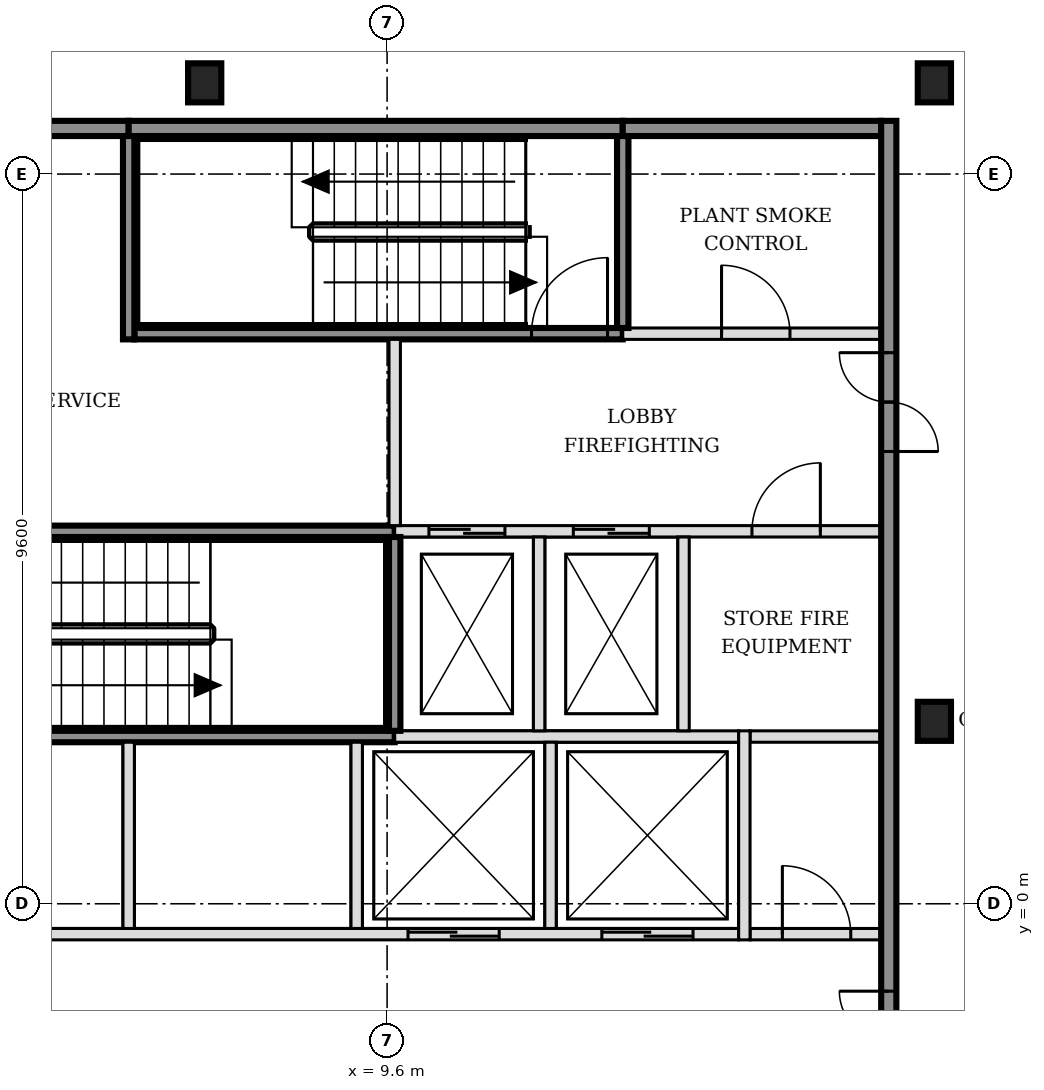
"""IFC4 building model, lengths in metres.
Left out: names, types, materials, properties, quantities, classifications, styles, units other than length and angle.
Written with IfcOpenShell. Run it as: python <this file> out.ifc"""

import sys

from ifc_helpers import new_model, si_unit, direction, frame, frame_2d, origin, origin_2d, place, context, subcontext, project, spatial, rectangle, i_section, extrude, element, fill, save


model = new_model("IFC4")
c1 = context("Model", 3, precision=1e-05, world=origin(), true_north=direction((0.0, 1.0)))
c2 = subcontext(c1, "Body", "Model", "MODEL_VIEW")
j1 = project(units=[si_unit("LENGTHUNIT", "METRE"), si_unit("PLANEANGLEUNIT", "RADIAN")], contexts=[c1])
p1 = place(None, origin())
s1 = spatial("IfcSite", under=j1, at=p1, CompositionType="ELEMENT")
p2 = place(p1, origin())
s2 = spatial("IfcBuilding", under=s1, at=p2, CompositionType="ELEMENT")
p3 = place(p2, frame((0.0, 0.0, 79.8)))
s3 = spatial("IfcBuildingStorey", under=s2, at=p3, CompositionType="ELEMENT", Elevation=79.8)
for number, where, z_axis, x_axis in (
    (1, (16.8, 2.4, -0.15), (0.0, 0.0, 1.0), (1.0, 0.0, 0.0)),
    (2, (7.2, 10.8, -0.15), (0.0, 0.0, 1.0), (1.0, 0.0, 0.0)),
    (3, (16.8, 10.8, -0.15), (0.0, 0.0, 1.0), (1.0, 0.0, 0.0)),
):
    element("IfcColumn", number, at=place(p3, frame(where, z_axis=z_axis, x_axis=x_axis)), inside=s3, PredefinedType="COLUMN", context=c2, shape_type="SweptSolid", body=[
        extrude(i_section(OverallWidth=0.437, OverallDepth=0.514, WebThickness=0.061, FlangeThickness=0.097, FilletRadius=0.015, at=origin_2d()), origin(), (0.0, 0.0, 1.0), 3.6),
    ])
p4 = place(p3, frame((-1.7, -0.4, 0.0), z_axis=(0.0, 0.0, 1.0), x_axis=(1.0, 0.0, 0.0)))
e4 = element("IfcWall", 4, at=p4, inside=s3, PredefinedType="SOLIDWALL", context=c2, shape_type="SweptSolid", body=[
    extrude(rectangle(XDim=15.925, YDim=0.15, at=frame_2d((7.962, 0.0))), origin(), (0.0, 0.0, 1.0), 3.45),
])
p5 = place(p4, frame((0.6, 0.0, 0.0)))
e5 = element("IfcOpeningElement", 5, at=p5, cuts=e4, PredefinedType="OPENING", context=c2, shape_type="SweptSolid", body=[
    extrude(rectangle(XDim=1.1, YDim=2.1, at=frame_2d((0.55, 1.05))), frame((0.0, 0.085, 0.0), z_axis=(0.0, -1.0, 0.0), x_axis=(1.0, 0.0, 0.0)), (0.0, 0.0, 1.0), 0.17),
])
p6 = place(p4, frame((3.1, 0.0, 0.0)))
e6 = element("IfcOpeningElement", 6, at=p6, cuts=e4, PredefinedType="OPENING", context=c2, shape_type="SweptSolid", body=[
    extrude(rectangle(XDim=1.1, YDim=2.1, at=frame_2d((0.55, 1.05))), frame((0.0, 0.085, 0.0), z_axis=(0.0, -1.0, 0.0), x_axis=(1.0, 0.0, 0.0)), (0.0, 0.0, 1.0), 0.17),
])
p7 = place(p4, frame((11.575, 0.0, 0.0)))
e7 = element("IfcOpeningElement", 7, at=p7, cuts=e4, PredefinedType="OPENING", context=c2, shape_type="SweptSolid", body=[
    extrude(rectangle(XDim=1.2, YDim=2.1, at=frame_2d((0.6, 1.05))), frame((0.0, 0.085, 0.0), z_axis=(0.0, -1.0, 0.0), x_axis=(1.0, 0.0, 0.0)), (0.0, 0.0, 1.0), 0.17),
])
p8 = place(p4, frame((14.125, 0.0, 0.0)))
e8 = element("IfcOpeningElement", 8, at=p8, cuts=e4, PredefinedType="OPENING", context=c2, shape_type="SweptSolid", body=[
    extrude(rectangle(XDim=1.2, YDim=2.1, at=frame_2d((0.6, 1.05))), frame((0.0, 0.085, 0.0), z_axis=(0.0, -1.0, 0.0), x_axis=(1.0, 0.0, 0.0)), (0.0, 0.0, 1.0), 0.17),
])
p9 = place(p3, frame((14.375, -0.4, 0.0), z_axis=(0.0, 0.0, 1.0), x_axis=(1.0, 0.0, 0.0)))
e9 = element("IfcWall", 9, at=p9, inside=s3, PredefinedType="PARTITIONING", context=c2, shape_type="SweptSolid", body=[
    extrude(rectangle(XDim=1.725, YDim=0.15, at=frame_2d((0.863, 0.0))), origin(), (0.0, 0.0, 1.0), 3.45),
])
p10 = place(p9, frame((0.425, 0.0, 0.0)))
e10 = element("IfcOpeningElement", 10, at=p10, cuts=e9, PredefinedType="OPENING", context=c2, shape_type="SweptSolid", body=[
    extrude(rectangle(XDim=0.9, YDim=2.1, at=frame_2d((0.45, 1.05))), frame((0.0, 0.085, 0.0), z_axis=(0.0, -1.0, 0.0), x_axis=(1.0, 0.0, 0.0)), (0.0, 0.0, 1.0), 0.17),
])
p11 = place(p3, frame((3.2, 2.2, 0.0), z_axis=(0.0, 0.0, 1.0), x_axis=(1.0, 0.0, 0.0)))
e11 = element("IfcWall", 11, at=p11, inside=s3, PredefinedType="SOLIDWALL", context=c2, shape_type="SweptSolid", body=[
    extrude(rectangle(XDim=6.5, YDim=0.15, at=frame_2d((3.25, 0.0))), origin(), (0.0, 0.0, 1.0), 3.45),
])
p12 = place(p3, frame((9.7, 2.2, 0.0), z_axis=(0.0, 0.0, 1.0), x_axis=(1.0, 0.0, 0.0)))
e12 = element("IfcWall", 12, at=p12, inside=s3, PredefinedType="SOLIDWALL", context=c2, shape_type="SweptSolid", body=[
    extrude(rectangle(XDim=4.525, YDim=0.15, at=frame_2d((2.263, 0.0))), origin(), (0.0, 0.0, 1.0), 3.45),
])
p13 = place(p3, frame((14.375, 2.2, 0.0), z_axis=(0.0, 0.0, 1.0), x_axis=(1.0, 0.0, 0.0)))
e13 = element("IfcWall", 13, at=p13, inside=s3, PredefinedType="PARTITIONING", context=c2, shape_type="SweptSolid", body=[
    extrude(rectangle(XDim=1.725, YDim=0.15, at=frame_2d((0.863, 0.0))), origin(), (0.0, 0.0, 1.0), 3.45),
])
p14 = place(p3, frame((3.275, 4.9, 0.0), z_axis=(0.0, 0.0, 1.0), x_axis=(1.0, 0.0, 0.0)))
e14 = element("IfcWall", 14, at=p14, inside=s3, PredefinedType="SOLIDWALL", context=c2, shape_type="SweptSolid", body=[
    extrude(rectangle(XDim=6.425, YDim=0.15, at=frame_2d((3.212, 0.0))), origin(), (0.0, 0.0, 1.0), 3.45),
])
p15 = place(p14, frame((0.1, 0.0, 0.0)))
e15 = element("IfcOpeningElement", 15, at=p15, cuts=e14, PredefinedType="OPENING", context=c2, shape_type="SweptSolid", body=[
    extrude(rectangle(XDim=1.0, YDim=2.1, at=frame_2d((0.5, 1.05))), frame((0.0, 0.085, 0.0), z_axis=(0.0, -1.0, 0.0), x_axis=(1.0, 0.0, 0.0)), (0.0, 0.0, 1.0), 0.17),
])
p16 = place(p3, frame((9.7, 4.9, 0.0), z_axis=(0.0, 0.0, 1.0), x_axis=(1.0, 0.0, 0.0)))
e16 = element("IfcWall", 16, at=p16, inside=s3, PredefinedType="SOLIDWALL", context=c2, shape_type="SweptSolid", body=[
    extrude(rectangle(XDim=6.4, YDim=0.15, at=frame_2d((3.2, 0.0))), origin(), (0.0, 0.0, 1.0), 3.45),
])
p17 = place(p16, frame((0.45, 0.0, 0.0)))
e17 = element("IfcOpeningElement", 17, at=p17, cuts=e16, PredefinedType="OPENING", context=c2, shape_type="SweptSolid", body=[
    extrude(rectangle(XDim=1.0, YDim=2.1, at=frame_2d((0.5, 1.05))), frame((0.0, 0.085, 0.0), z_axis=(0.0, -1.0, 0.0), x_axis=(1.0, 0.0, 0.0)), (0.0, 0.0, 1.0), 0.17),
])
p18 = place(p16, frame((2.35, 0.0, 0.0)))
e18 = element("IfcOpeningElement", 18, at=p18, cuts=e16, PredefinedType="OPENING", context=c2, shape_type="SweptSolid", body=[
    extrude(rectangle(XDim=1.0, YDim=2.1, at=frame_2d((0.5, 1.05))), frame((0.0, 0.085, 0.0), z_axis=(0.0, -1.0, 0.0), x_axis=(1.0, 0.0, 0.0)), (0.0, 0.0, 1.0), 0.17),
])
p19 = place(p16, frame((4.7, 0.0, 0.0)))
e19 = element("IfcOpeningElement", 19, at=p19, cuts=e16, PredefinedType="OPENING", context=c2, shape_type="SweptSolid", body=[
    extrude(rectangle(XDim=0.9, YDim=2.1, at=frame_2d((0.45, 1.05))), frame((0.0, 0.085, 0.0), z_axis=(0.0, -1.0, 0.0), x_axis=(1.0, 0.0, 0.0)), (0.0, 0.0, 1.0), 0.17),
])
p20 = place(p3, frame((6.275, 7.5, 0.0), z_axis=(0.0, 0.0, 1.0), x_axis=(1.0, 0.0, 0.0)))
e20 = element("IfcWall", 20, at=p20, inside=s3, PredefinedType="SOLIDWALL", context=c2, shape_type="SweptSolid", body=[
    extrude(rectangle(XDim=6.425, YDim=0.15, at=frame_2d((3.212, 0.0))), origin(), (0.0, 0.0, 1.0), 3.45),
])
p21 = place(p20, frame((5.225, 0.0, 0.0)))
e21 = element("IfcOpeningElement", 21, at=p21, cuts=e20, PredefinedType="OPENING", context=c2, shape_type="SweptSolid", body=[
    extrude(rectangle(XDim=1.0, YDim=2.1, at=frame_2d((0.5, 1.05))), frame((0.0, 0.085, 0.0), z_axis=(0.0, -1.0, 0.0), x_axis=(1.0, 0.0, 0.0)), (0.0, 0.0, 1.0), 0.17),
])
p22 = place(p3, frame((12.7, 7.5, 0.0), z_axis=(0.0, 0.0, 1.0), x_axis=(1.0, 0.0, 0.0)))
e22 = element("IfcWall", 22, at=p22, inside=s3, PredefinedType="SOLIDWALL", context=c2, shape_type="SweptSolid", body=[
    extrude(rectangle(XDim=3.4, YDim=0.15, at=frame_2d((1.7, 0.0))), origin(), (0.0, 0.0, 1.0), 3.45),
])
p23 = place(p22, frame((1.3, 0.0, 0.0)))
e23 = element("IfcOpeningElement", 23, at=p23, cuts=e22, PredefinedType="OPENING", context=c2, shape_type="SweptSolid", body=[
    extrude(rectangle(XDim=0.9, YDim=2.1, at=frame_2d((0.45, 1.05))), frame((0.0, 0.085, 0.0), z_axis=(0.0, -1.0, 0.0), x_axis=(1.0, 0.0, 0.0)), (0.0, 0.0, 1.0), 0.17),
])
p24 = place(p3, frame((-1.7, 10.2, 0.0), z_axis=(0.0, 0.0, 1.0), x_axis=(1.0, 0.0, 0.0)))
e24 = element("IfcWall", 24, at=p24, inside=s3, PredefinedType="SOLIDWALL", context=c2, shape_type="SweptSolid", body=[
    extrude(rectangle(XDim=7.9, YDim=0.2, at=frame_2d((3.95, 0.0))), origin(), (0.0, 0.0, 1.0), 3.45),
])
p25 = place(p3, frame((6.2, 10.2, 0.0), z_axis=(0.0, 0.0, 1.0), x_axis=(1.0, 0.0, 0.0)))
e25 = element("IfcWall", 25, at=p25, inside=s3, PredefinedType="SOLIDWALL", context=c2, shape_type="SweptSolid", body=[
    extrude(rectangle(XDim=6.5, YDim=0.2, at=frame_2d((3.25, 0.0))), origin(), (0.0, 0.0, 1.0), 3.45),
])
p26 = place(p3, frame((12.7, 10.2, 0.0), z_axis=(0.0, 0.0, 1.0), x_axis=(1.0, 0.0, 0.0)))
e26 = element("IfcWall", 26, at=p26, inside=s3, PredefinedType="SOLIDWALL", context=c2, shape_type="SweptSolid", body=[
    extrude(rectangle(XDim=3.4, YDim=0.2, at=frame_2d((1.7, 0.0))), origin(), (0.0, 0.0, 1.0), 3.45),
])
p27 = place(p3, frame((6.2, -0.325, 0.0), z_axis=(0.0, 0.0, 1.0), x_axis=(0.0, 1.0, 0.0)))
e27 = element("IfcWall", 27, at=p27, inside=s3, PredefinedType="SOLIDWALL", context=c2, shape_type="SweptSolid", body=[
    extrude(rectangle(XDim=2.45, YDim=0.15, at=frame_2d((1.225, 0.0))), origin(), (0.0, 0.0, 1.0), 3.45),
])
p28 = place(p3, frame((6.2, 7.425, 0.0), z_axis=(0.0, 0.0, 1.0), x_axis=(0.0, 1.0, 0.0)))
e28 = element("IfcWall", 28, at=p28, inside=s3, PredefinedType="SOLIDWALL", context=c2, shape_type="SweptSolid", body=[
    extrude(rectangle(XDim=2.675, YDim=0.15, at=frame_2d((1.337, 0.0))), origin(), (0.0, 0.0, 1.0), 3.45),
])
p29 = place(p3, frame((9.2, -0.325, 0.0), z_axis=(0.0, 0.0, 1.0), x_axis=(0.0, 1.0, 0.0)))
e29 = element("IfcWall", 29, at=p29, inside=s3, PredefinedType="SOLIDWALL", context=c2, shape_type="SweptSolid", body=[
    extrude(rectangle(XDim=2.45, YDim=0.15, at=frame_2d((1.225, 0.0))), origin(), (0.0, 0.0, 1.0), 3.45),
])
p30 = place(p3, frame((9.7, 2.275, 0.0), z_axis=(0.0, 0.0, 1.0), x_axis=(0.0, 1.0, 0.0)))
e30 = element("IfcWall", 30, at=p30, inside=s3, PredefinedType="SOLIDWALL", context=c2, shape_type="SweptSolid", body=[
    extrude(rectangle(XDim=2.55, YDim=0.15, at=frame_2d((1.275, 0.0))), origin(), (0.0, 0.0, 1.0), 3.45),
])
p31 = place(p3, frame((9.7, 4.975, 0.0), z_axis=(0.0, 0.0, 1.0), x_axis=(0.0, 1.0, 0.0)))
e31 = element("IfcWall", 31, at=p31, inside=s3, PredefinedType="SOLIDWALL", context=c2, shape_type="SweptSolid", body=[
    extrude(rectangle(XDim=2.45, YDim=0.15, at=frame_2d((1.225, 0.0))), origin(), (0.0, 0.0, 1.0), 3.45),
])
p32 = place(p3, frame((11.6, 2.275, 0.0), z_axis=(0.0, 0.0, 1.0), x_axis=(0.0, 1.0, 0.0)))
e32 = element("IfcWall", 32, at=p32, inside=s3, PredefinedType="SOLIDWALL", context=c2, shape_type="SweptSolid", body=[
    extrude(rectangle(XDim=2.55, YDim=0.15, at=frame_2d((1.275, 0.0))), origin(), (0.0, 0.0, 1.0), 3.45),
])
p33 = place(p3, frame((11.75, -0.325, 0.0), z_axis=(0.0, 0.0, 1.0), x_axis=(0.0, 1.0, 0.0)))
e33 = element("IfcWall", 33, at=p33, inside=s3, PredefinedType="SOLIDWALL", context=c2, shape_type="SweptSolid", body=[
    extrude(rectangle(XDim=2.45, YDim=0.15, at=frame_2d((1.225, 0.0))), origin(), (0.0, 0.0, 1.0), 3.45),
])
p34 = place(p3, frame((12.7, 7.575, 0.0), z_axis=(0.0, 0.0, 1.0), x_axis=(0.0, 1.0, 0.0)))
e34 = element("IfcWall", 34, at=p34, inside=s3, PredefinedType="SOLIDWALL", context=c2, shape_type="SweptSolid", body=[
    extrude(rectangle(XDim=2.525, YDim=0.15, at=frame_2d((1.263, 0.0))), origin(), (0.0, 0.0, 1.0), 3.45),
])
p35 = place(p3, frame((13.5, 2.275, 0.0), z_axis=(0.0, 0.0, 1.0), x_axis=(0.0, 1.0, 0.0)))
e35 = element("IfcWall", 35, at=p35, inside=s3, PredefinedType="SOLIDWALL", context=c2, shape_type="SweptSolid", body=[
    extrude(rectangle(XDim=2.55, YDim=0.15, at=frame_2d((1.275, 0.0))), origin(), (0.0, 0.0, 1.0), 3.45),
])
p36 = place(p3, frame((14.3, -0.475, 0.0), z_axis=(0.0, 0.0, 1.0), x_axis=(0.0, 1.0, 0.0)))
e36 = element("IfcWall", 36, at=p36, inside=s3, PredefinedType="SOLIDWALL", context=c2, shape_type="SweptSolid", body=[
    extrude(rectangle(XDim=2.75, YDim=0.15, at=frame_2d((1.375, 0.0))), origin(), (0.0, 0.0, 1.0), 3.45),
])
p37 = place(p3, frame((16.2, -5.5, 0.0), z_axis=(0.0, 0.0, 1.0), x_axis=(0.0, 1.0, 0.0)))
e37 = element("IfcWall", 37, at=p37, inside=s3, PredefinedType="SOLIDWALL", context=c2, shape_type="SweptSolid", body=[
    extrude(rectangle(XDim=15.8, YDim=0.2, at=frame_2d((7.9, 0.0))), origin(), (0.0, 0.0, 1.0), 3.45),
])
p38 = place(p37, frame((3.05, 0.0, 0.0)))
e38 = element("IfcOpeningElement", 38, at=p38, cuts=e37, PredefinedType="OPENING", context=c2, shape_type="SweptSolid", body=[
    extrude(rectangle(XDim=1.3, YDim=2.1, at=frame_2d((0.65, 1.05))), frame((0.0, 0.11, 0.0), z_axis=(0.0, -1.0, 0.0), x_axis=(1.0, 0.0, 0.0)), (0.0, 0.0, 1.0), 0.22),
])
p39 = place(p37, frame((11.45, 0.0, 0.0)))
e39 = element("IfcOpeningElement", 39, at=p39, cuts=e37, PredefinedType="OPENING", context=c2, shape_type="SweptSolid", body=[
    extrude(rectangle(XDim=1.3, YDim=2.1, at=frame_2d((0.65, 1.05))), frame((0.0, 0.11, 0.0), z_axis=(0.0, -1.0, 0.0), x_axis=(1.0, 0.0, 0.0)), (0.0, 0.0, 1.0), 0.22),
])
p40 = place(p7, origin())
e40 = element("IfcDoor", 40, at=p40, inside=s3, OperationType="DOUBLE_DOOR_SLIDING", PredefinedType="DOOR", context=c2, shape_type="SweptSolid", body=[
    extrude(rectangle(XDim=1.2, YDim=2.1, at=frame_2d((0.6, 1.05))), frame((0.0, 0.025, 0.0), z_axis=(0.0, -1.0, 0.0), x_axis=(1.0, 0.0, 0.0)), (0.0, 0.0, 1.0), 0.05),
])
fill(e7, e40)
p41 = place(p8, origin())
e41 = element("IfcDoor", 41, at=p41, inside=s3, OperationType="DOUBLE_DOOR_SLIDING", PredefinedType="DOOR", context=c2, shape_type="SweptSolid", body=[
    extrude(rectangle(XDim=1.2, YDim=2.1, at=frame_2d((0.6, 1.05))), frame((0.0, 0.025, 0.0), z_axis=(0.0, -1.0, 0.0), x_axis=(1.0, 0.0, 0.0)), (0.0, 0.0, 1.0), 0.05),
])
fill(e8, e41)
p42 = place(p17, origin())
e42 = element("IfcDoor", 42, at=p42, inside=s3, OperationType="DOUBLE_DOOR_SLIDING", PredefinedType="DOOR", context=c2, shape_type="SweptSolid", body=[
    extrude(rectangle(XDim=1.0, YDim=2.1, at=frame_2d((0.5, 1.05))), frame((0.0, 0.025, 0.0), z_axis=(0.0, -1.0, 0.0), x_axis=(1.0, 0.0, 0.0)), (0.0, 0.0, 1.0), 0.05),
])
fill(e17, e42)
p43 = place(p18, origin())
e43 = element("IfcDoor", 43, at=p43, inside=s3, OperationType="DOUBLE_DOOR_SLIDING", PredefinedType="DOOR", context=c2, shape_type="SweptSolid", body=[
    extrude(rectangle(XDim=1.0, YDim=2.1, at=frame_2d((0.5, 1.05))), frame((0.0, 0.025, 0.0), z_axis=(0.0, -1.0, 0.0), x_axis=(1.0, 0.0, 0.0)), (0.0, 0.0, 1.0), 0.05),
])
fill(e18, e43)
p44 = place(p21, origin())
e44 = element("IfcDoor", 44, at=p44, inside=s3, OperationType="SINGLE_SWING_RIGHT", PredefinedType="DOOR", context=c2, shape_type="SweptSolid", body=[
    extrude(rectangle(XDim=1.0, YDim=2.1, at=frame_2d((0.5, 1.05))), frame((0.0, 0.025, 0.0), z_axis=(0.0, -1.0, 0.0), x_axis=(1.0, 0.0, 0.0)), (0.0, 0.0, 1.0), 0.05),
])
fill(e21, e44)
p45 = place(p38, origin())
e45 = element("IfcDoor", 45, at=p45, inside=s3, OperationType="DOUBLE_DOOR_SINGLE_SWING", PredefinedType="DOOR", context=c2, shape_type="SweptSolid", body=[
    extrude(rectangle(XDim=1.3, YDim=2.1, at=frame_2d((0.65, 1.05))), frame((0.0, 0.025, 0.0), z_axis=(0.0, -1.0, 0.0), x_axis=(1.0, 0.0, 0.0)), (0.0, 0.0, 1.0), 0.05),
])
fill(e38, e45)
p46 = place(p39, origin())
e46 = element("IfcDoor", 46, at=p46, inside=s3, OperationType="DOUBLE_DOOR_SINGLE_SWING", PredefinedType="DOOR", context=c2, shape_type="SweptSolid", body=[
    extrude(rectangle(XDim=1.3, YDim=2.1, at=frame_2d((0.65, 1.05))), frame((0.0, 0.025, 0.0), z_axis=(0.0, -1.0, 0.0), x_axis=(1.0, 0.0, 0.0)), (0.0, 0.0, 1.0), 0.05),
])
fill(e39, e46)
p47 = place(p10, origin())
e47 = element("IfcDoor", 47, at=p47, inside=s3, OperationType="SINGLE_SWING_LEFT", PredefinedType="DOOR", context=c2, shape_type="SweptSolid", body=[
    extrude(rectangle(XDim=0.9, YDim=2.1, at=frame_2d((0.45, 1.05))), frame((0.0, 0.025, 0.0), z_axis=(0.0, -1.0, 0.0), x_axis=(1.0, 0.0, 0.0)), (0.0, 0.0, 1.0), 0.05),
])
fill(e10, e47)
p48 = place(p19, origin())
e48 = element("IfcDoor", 48, at=p48, inside=s3, OperationType="SINGLE_SWING_RIGHT", PredefinedType="DOOR", context=c2, shape_type="SweptSolid", body=[
    extrude(rectangle(XDim=0.9, YDim=2.1, at=frame_2d((0.45, 1.05))), frame((0.0, 0.025, 0.0), z_axis=(0.0, -1.0, 0.0), x_axis=(1.0, 0.0, 0.0)), (0.0, 0.0, 1.0), 0.05),
])
fill(e19, e48)
p49 = place(p23, origin())
e49 = element("IfcDoor", 49, at=p49, inside=s3, OperationType="SINGLE_SWING_LEFT", PredefinedType="DOOR", context=c2, shape_type="SweptSolid", body=[
    extrude(rectangle(XDim=0.9, YDim=2.1, at=frame_2d((0.45, 1.05))), frame((0.0, 0.025, 0.0), z_axis=(0.0, -1.0, 0.0), x_axis=(1.0, 0.0, 0.0)), (0.0, 0.0, 1.0), 0.05),
])
fill(e23, e49)
save(model, sys.argv[1])
